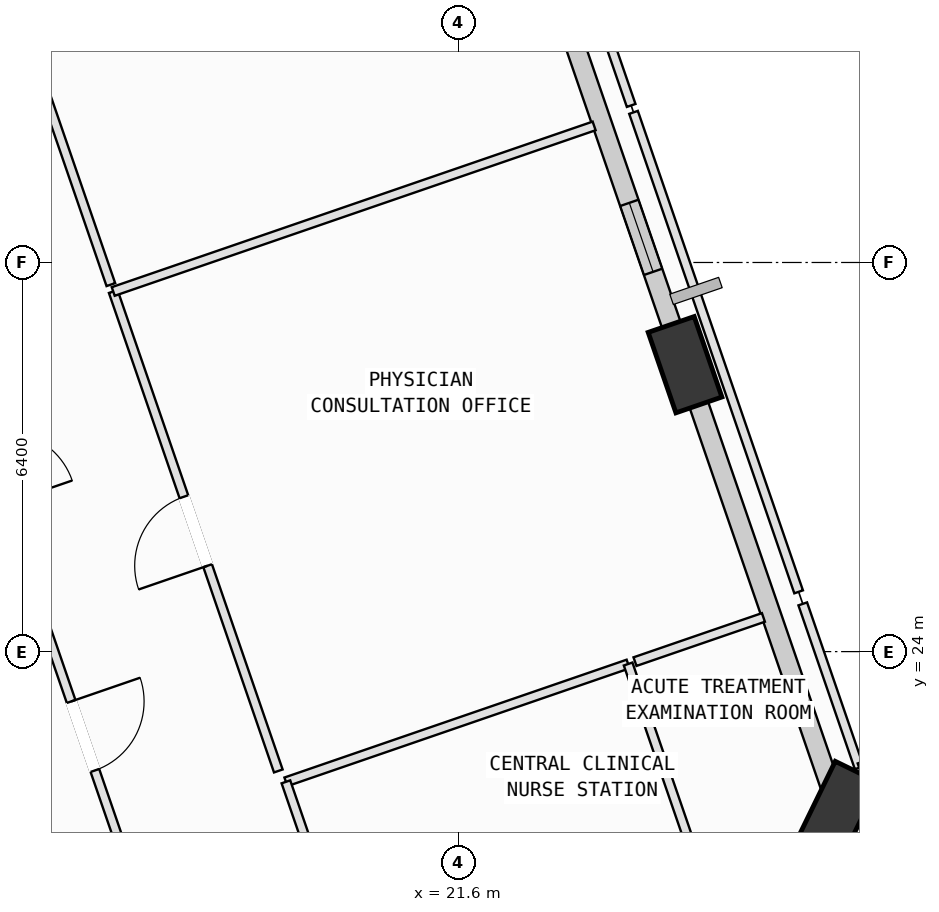
"""IFC4 building model, lengths in metres.
Left out: names, types, materials, properties, quantities, classifications, styles, units other than length and angle.
Written with IfcOpenShell. Run it as: python <this file> out.ifc"""

import sys

from ifc_helpers import new_model, si_unit, direction, frame, frame_2d, origin, origin_2d, place, context, subcontext, project, spatial, rectangle, extrude, element, fill, save


model = new_model("IFC4")
c1 = context("Model", 3, precision=1e-05, world=origin(), true_north=direction((0.0, 1.0)))
c2 = subcontext(c1, "Body", "Model", "MODEL_VIEW")
j1 = project(units=[si_unit("LENGTHUNIT", "METRE"), si_unit("PLANEANGLEUNIT", "RADIAN")], contexts=[c1])
p1 = place(None, origin())
s1 = spatial("IfcSite", under=j1, at=p1, CompositionType="ELEMENT")
p2 = place(p1, origin())
s2 = spatial("IfcBuilding", under=s1, at=p2, CompositionType="ELEMENT")
p3 = place(p2, frame((0.0, 0.0, 104.4)))
s3 = spatial("IfcBuildingStorey", under=s2, at=p3, CompositionType="ELEMENT", Elevation=104.4)
p4 = place(p3, frame((27.846, 21.391, 0.002), z_axis=(0.014289820189, -0.023755299374, 0.99961566954), x_axis=(-0.087476556441, 0.9958549209, 0.024916432185)))
e1 = element("IfcColumn", 1, at=p4, inside=s3, PredefinedType="COLUMN", context=c2, shape_type="SweptSolid", body=[
    extrude(rectangle(XDim=1.4, YDim=0.8, at=origin_2d()), origin(), (0.0, 0.0, 1.0), 3.998),
])
p5 = place(p3, frame((25.323, 28.719, 0.002), z_axis=(-0.015933294599, -0.03443056764, 0.999280073921), x_axis=(0.101345028105, 0.994204412113, 0.035871607353)))
e2 = element("IfcColumn", 2, at=p5, inside=s3, PredefinedType="COLUMN", context=c2, shape_type="SweptSolid", body=[
    extrude(rectangle(XDim=1.4, YDim=0.8, at=origin_2d()), origin(), (0.0, 0.0, 1.0), 3.999),
])
p6 = place(p3, frame((25.502, 28.2, 0.0), z_axis=(0.0, 0.0, 1.0), x_axis=(0.325552109917, -0.945524100025, 0.0)))
e3 = element("IfcWall", 3, at=p6, inside=s3, PredefinedType="SOLIDWALL", context=c2, shape_type="SweptSolid", body=[
    extrude(rectangle(XDim=6.76, YDim=0.32, at=frame_2d((3.38, 0.0))), origin(), (0.0, 0.0, 1.0), 2.965),
])
p7 = place(p3, frame((23.155, 35.017, 0.0), z_axis=(0.0, 0.0, 1.0), x_axis=(0.325557790536, -0.94552214412, 0.0)))
e4 = element("IfcWall", 4, at=p7, inside=s3, PredefinedType="SOLIDWALL", context=c2, shape_type="SweptSolid", body=[
    extrude(rectangle(XDim=6.223, YDim=0.32, at=frame_2d((3.111, 0.0))), origin(), (0.0, 0.0, 1.0), 3.165),
])
p8 = place(p7, frame((3.846, 0.0, 0.75)))
e5 = element("IfcOpeningElement", 5, at=p8, cuts=e4, PredefinedType="OPENING", context=c2, shape_type="SweptSolid", body=[
    extrude(rectangle(XDim=1.2, YDim=1.75, at=frame_2d((0.6, 0.875))), frame((0.0, 0.17, 0.0), z_axis=(0.0, -1.0, 0.0), x_axis=(1.0, 0.0, 0.0)), (0.0, 0.0, 1.0), 0.34),
])
p9 = place(p3, frame((14.722, 24.645, 0.0), z_axis=(0.0, 0.0, 1.0), x_axis=(0.325666906351, -0.945484566827, 0.0)))
e6 = element("IfcWall", 6, at=p9, inside=s3, PredefinedType="PARTITIONING", context=c2, shape_type="SweptSolid", body=[
    extrude(rectangle(XDim=4.299, YDim=0.15, at=frame_2d((2.15, 0.0))), origin(), (0.0, 0.0, 1.0), 3.78),
])
p10 = place(p9, frame((1.55, 0.0, 0.0)))
e7 = element("IfcOpeningElement", 7, at=p10, cuts=e6, PredefinedType="OPENING", context=c2, shape_type="SweptSolid", body=[
    extrude(rectangle(XDim=1.2, YDim=2.15, at=frame_2d((0.6, 1.075))), frame((0.0, 0.085, 0.0), z_axis=(0.0, -1.0, 0.0), x_axis=(1.0, 0.0, 0.0)), (0.0, 0.0, 1.0), 0.17),
])
p11 = place(p3, frame((18.759, 21.858, 0.0), z_axis=(0.0, 0.0, 1.0), x_axis=(0.945511506532, 0.325588683795, 0.0)))
e8 = element("IfcWall", 8, at=p11, inside=s3, PredefinedType="PARTITIONING", context=c2, shape_type="SweptSolid", body=[
    extrude(rectangle(XDim=5.952, YDim=0.15, at=frame_2d((2.976, 0.0))), origin(), (0.0, 0.0, 1.0), 3.78),
])
p12 = place(p3, frame((24.387, 23.796, 0.0), z_axis=(0.0, 0.0, 1.0), x_axis=(0.325472958925, -0.94555134869, 0.0)))
e9 = element("IfcWall", 9, at=p12, inside=s3, PredefinedType="PARTITIONING", context=c2, shape_type="SweptSolid", body=[
    extrude(rectangle(XDim=3.401, YDim=0.15, at=frame_2d((1.7, 0.0))), origin(), (0.0, 0.0, 1.0), 2.965),
])
p13 = place(p3, frame((19.199, 20.58, 0.0), z_axis=(0.0, 0.0, 1.0), x_axis=(-0.32553412095, 0.945530293591, 0.0)))
e10 = element("IfcWall", 10, at=p13, inside=s3, PredefinedType="PARTITIONING", context=c2, shape_type="SweptSolid", body=[
    extrude(rectangle(XDim=1.352, YDim=0.15, at=frame_2d((0.676, 0.0))), origin(), (0.0, 0.0, 1.0), 3.78),
])
p14 = place(p3, frame((24.5, 23.835, 0.0), z_axis=(0.0, 0.0, 1.0), x_axis=(0.94554475493, 0.325492114227, 0.0)))
e11 = element("IfcWall", 11, at=p14, inside=s3, PredefinedType="PARTITIONING", context=c2, shape_type="SweptSolid", body=[
    extrude(rectangle(XDim=2.234, YDim=0.15, at=frame_2d((1.117, 0.0))), origin(), (0.0, 0.0, 1.0), 3.78),
])
p15 = place(p3, frame((27.259, 24.785, 0.0), z_axis=(0.0, 0.0, 1.0), x_axis=(0.325592032379, -0.945510353434, 0.0)))
e12 = element("IfcWall", 12, at=p15, inside=s3, PredefinedType="PARTITIONING", context=c2, shape_type="SweptSolid", body=[
    extrude(rectangle(XDim=2.85, YDim=0.15, at=frame_2d((1.425, 0.0))), origin(), (0.0, 0.0, 1.0), 3.78),
])
p16 = place(p3, frame((28.187, 22.09, 0.0), z_axis=(0.0, 0.0, 1.0), x_axis=(0.945489948999, 0.325651280271, 0.0)))
e13 = element("IfcWall", 13, at=p16, inside=s3, PredefinedType="PARTITIONING", context=c2, shape_type="SweptSolid", body=[
    extrude(rectangle(XDim=3.414, YDim=0.15, at=frame_2d((1.707, 0.0))), origin(), (0.0, 0.0, 1.0), 3.78),
])
p17 = place(p3, frame((18.634, 22.037, 0.0), z_axis=(0.0, 0.0, 1.0), x_axis=(-0.325538681008, 0.945528723608, 0.0)))
e14 = element("IfcWall", 14, at=p17, inside=s3, PredefinedType="PARTITIONING", context=c2, shape_type="SweptSolid", body=[
    extrude(rectangle(XDim=8.34, YDim=0.15, at=frame_2d((4.17, 0.0))), origin(), (0.0, 0.0, 1.0), 3.78),
])
p18 = place(p17, frame((3.57, 0.0, 0.0)))
e15 = element("IfcOpeningElement", 15, at=p18, cuts=e14, PredefinedType="OPENING", context=c2, shape_type="SweptSolid", body=[
    extrude(rectangle(XDim=1.2, YDim=2.15, at=frame_2d((0.6, 1.075))), frame((0.0, 0.085, 0.0), z_axis=(0.0, -1.0, 0.0), x_axis=(1.0, 0.0, 0.0)), (0.0, 0.0, 1.0), 0.17),
])
p19 = place(p3, frame((15.919, 29.923, 0.0), z_axis=(0.0, 0.0, 1.0), x_axis=(0.945531989451, 0.325529195195, 0.0)))
e16 = element("IfcWall", 16, at=p19, inside=s3, PredefinedType="PARTITIONING", context=c2, shape_type="SweptSolid", body=[
    extrude(rectangle(XDim=8.365, YDim=0.15, at=frame_2d((4.182, 0.0))), origin(), (0.0, 0.0, 1.0), 3.78),
])
p20 = place(p3, frame((24.476, 32.869, 0.0), z_axis=(0.0, 0.0, 1.0), x_axis=(0.325512510364, -0.945537733566, 0.0)))
e17 = element("IfcWall", 17, at=p20, inside=s3, PredefinedType="PARTITIONING", context=c2, shape_type="SweptSolid", body=[
    extrude(rectangle(XDim=8.34, YDim=0.15, at=frame_2d((4.17, 0.0))), origin(), (0.0, 0.0, 1.0), 3.78),
])
p21 = place(p3, frame((15.88, 30.036, 0.0), z_axis=(0.0, 0.0, 1.0), x_axis=(-0.325525994822, 0.945533091274, 0.0)))
e18 = element("IfcWall", 18, at=p21, inside=s3, PredefinedType="PARTITIONING", context=c2, shape_type="SweptSolid", body=[
    extrude(rectangle(XDim=7.4, YDim=0.15, at=frame_2d((3.7, 0.0))), origin(), (0.0, 0.0, 1.0), 3.78),
])
p22 = place(p21, frame((3.24, 0.0, 0.0)))
e19 = element("IfcOpeningElement", 19, at=p22, cuts=e18, PredefinedType="OPENING", context=c2, shape_type="SweptSolid", body=[
    extrude(rectangle(XDim=0.92, YDim=2.1, at=frame_2d((0.46, 1.05))), frame((0.0, 0.085, 0.0), z_axis=(0.0, -1.0, 0.0), x_axis=(1.0, 0.0, 0.0)), (0.0, 0.0, 1.0), 0.17),
])
p23 = place(p3, frame((22.028, 39.979, 0.0), z_axis=(0.0, 0.0, 1.0), x_axis=(0.325566618003, -0.945519104641, 0.0)))
e20 = element("IfcWall", 20, at=p23, inside=s3, PredefinedType="PARTITIONING", context=c2, shape_type="SweptSolid", body=[
    extrude(rectangle(XDim=7.399, YDim=0.15, at=frame_2d((3.7, 0.0))), origin(), (0.0, 0.0, 1.0), 3.78),
])
p24 = place(p8, origin())
e21 = element("IfcWindow", 21, at=p24, inside=s3, PartitioningType="SINGLE_PANEL", PredefinedType="WINDOW", context=c2, shape_type="SweptSolid", body=[
    extrude(rectangle(XDim=1.2, YDim=1.75, at=frame_2d((0.6, 0.875))), frame((0.0, 0.03, 0.0), z_axis=(0.0, -1.0, 0.0), x_axis=(1.0, 0.0, 0.0)), (0.0, 0.0, 1.0), 0.06),
])
fill(e5, e21)
p25 = place(p10, origin())
e22 = element("IfcDoor", 22, at=p25, inside=s3, OperationType="SINGLE_SWING_LEFT", PredefinedType="DOOR", context=c2, shape_type="SweptSolid", body=[
    extrude(rectangle(XDim=1.2, YDim=2.15, at=frame_2d((0.6, 1.075))), frame((0.0, 0.025, 0.0), z_axis=(0.0, -1.0, 0.0), x_axis=(1.0, 0.0, 0.0)), (0.0, 0.0, 1.0), 0.05),
])
fill(e7, e22)
p26 = place(p18, origin())
e23 = element("IfcDoor", 23, at=p26, inside=s3, OperationType="SINGLE_SWING_LEFT", PredefinedType="DOOR", context=c2, shape_type="SweptSolid", body=[
    extrude(rectangle(XDim=1.2, YDim=2.15, at=frame_2d((0.6, 1.075))), frame((0.0, 0.025, 0.0), z_axis=(0.0, -1.0, 0.0), x_axis=(1.0, 0.0, 0.0)), (0.0, 0.0, 1.0), 0.05),
])
fill(e15, e23)
save(model, sys.argv[1])
